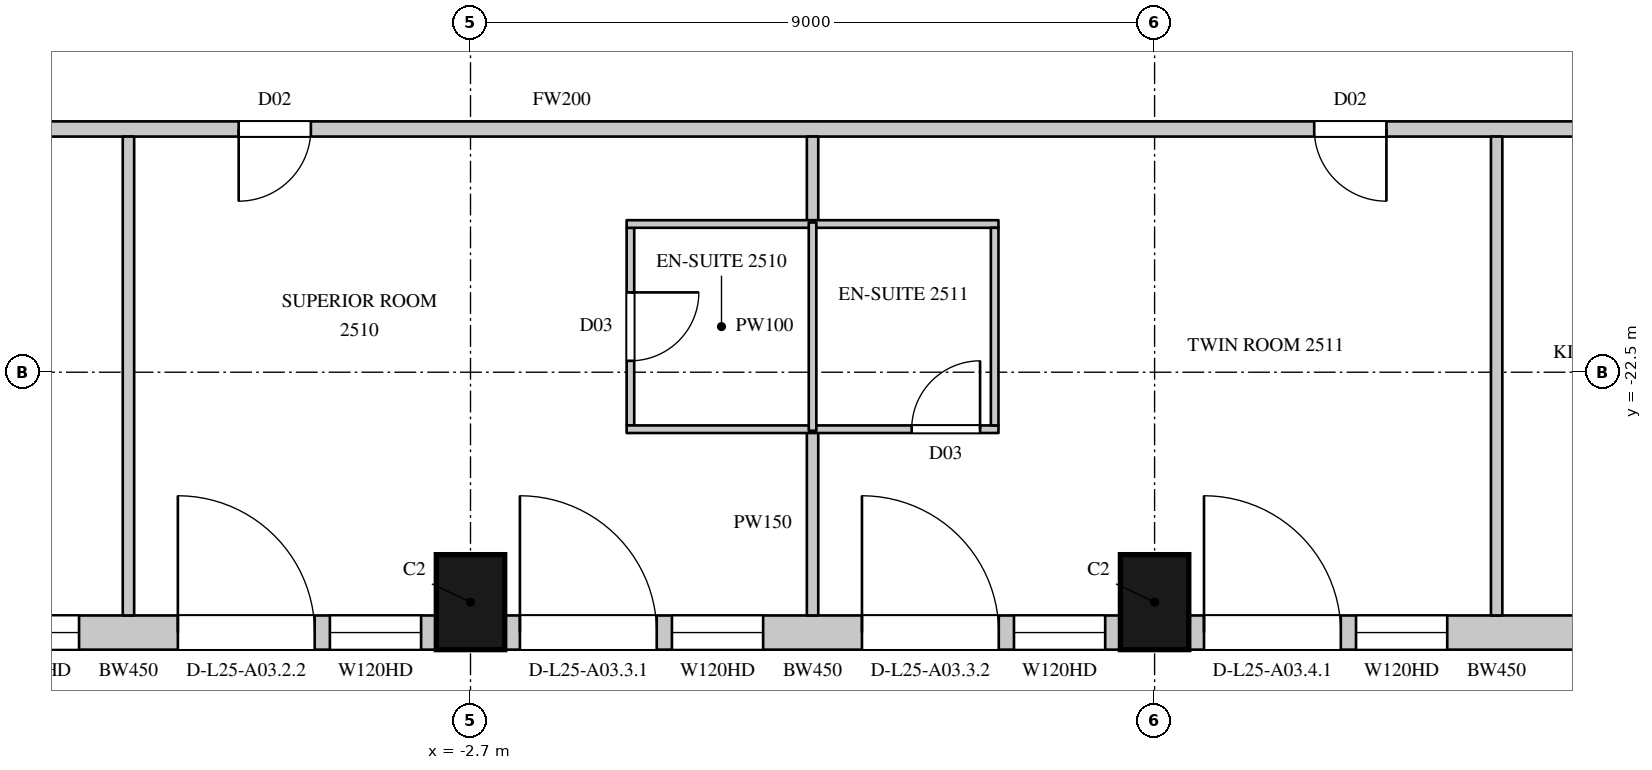
"""IFC4 building model, lengths in metres.
Left out: names, types, materials, properties, quantities, classifications, styles, units other than length and angle.
Written with IfcOpenShell. Run it as: python <this file> out.ifc"""

import sys

from ifc_helpers import new_model, si_unit, direction, frame, frame_2d, origin, origin_2d, place, context, subcontext, project, spatial, rectangle, extrude, element, fill, save


model = new_model("IFC4")
c1 = context("Model", 3, precision=1e-05, world=origin(), true_north=direction((0.0, 1.0)))
c2 = subcontext(c1, "Body", "Model", "MODEL_VIEW")
j1 = project(units=[si_unit("LENGTHUNIT", "METRE"), si_unit("PLANEANGLEUNIT", "RADIAN")], contexts=[c1])
p1 = place(None, origin())
s1 = spatial("IfcSite", under=j1, at=p1, CompositionType="ELEMENT")
p2 = place(p1, origin())
s2 = spatial("IfcBuilding", under=s1, at=p2, CompositionType="ELEMENT")
p3 = place(p2, frame((0.0, 0.0, 120.3)))
s3 = spatial("IfcBuildingStorey", under=s2, at=p3, CompositionType="ELEMENT", Elevation=120.3)
for number, where, z_axis, x_axis in (
    (1, (-2.7, -25.525, 0.0), (0.0, 0.0, 1.0), (1.0, 0.0, 0.0)),
    (2, (6.3, -25.525, 0.0), (0.0, 0.0, 1.0), (1.0, 0.0, 0.0)),
):
    element("IfcColumn", number, at=place(p3, frame(where, z_axis=z_axis, x_axis=x_axis)), inside=s3, PredefinedType="COLUMN", context=c2, shape_type="SweptSolid", body=[
        extrude(rectangle(XDim=0.9, YDim=1.25, at=origin_2d()), origin(), (0.0, 0.0, 1.0), 3.6),
    ])
p4 = place(p3, frame((-11.25, -25.925, 0.0), z_axis=(0.0, 0.0, 1.0), x_axis=(1.0, 0.0, 0.0)))
e3 = element("IfcWall", 3, at=p4, inside=s3, PredefinedType="SOLIDWALL", context=c2, shape_type="SweptSolid", body=[
    extrude(rectangle(XDim=8.1, YDim=0.45, at=frame_2d((4.05, 0.0))), origin(), (0.0, 0.0, 1.0), 3.3),
])
p5 = place(p4, frame((0.2, 0.0, 0.0)))
e4 = element("IfcOpeningElement", 4, at=p5, cuts=e3, PredefinedType="OPENING", context=c2, shape_type="SweptSolid", body=[
    extrude(rectangle(XDim=1.8, YDim=2.4, at=frame_2d((0.9, 1.2))), frame((0.0, 0.235, 0.0), z_axis=(0.0, -1.0, 0.0), x_axis=(1.0, 0.0, 0.0)), (0.0, 0.0, 1.0), 0.47),
])
p6 = place(p4, frame((2.2, 0.0, 1.05)))
e5 = element("IfcOpeningElement", 5, at=p6, cuts=e3, PredefinedType="OPENING", context=c2, shape_type="SweptSolid", body=[
    extrude(rectangle(XDim=1.2, YDim=2.0, at=frame_2d((0.6, 1.0))), frame((0.0, 0.235, 0.0), z_axis=(0.0, -1.0, 0.0), x_axis=(1.0, 0.0, 0.0)), (0.0, 0.0, 1.0), 0.47),
])
p7 = place(p4, frame((4.7, 0.0, 0.0)))
e6 = element("IfcOpeningElement", 6, at=p7, cuts=e3, PredefinedType="OPENING", context=c2, shape_type="SweptSolid", body=[
    extrude(rectangle(XDim=1.8, YDim=2.4, at=frame_2d((0.9, 1.2))), frame((0.0, 0.235, 0.0), z_axis=(0.0, -1.0, 0.0), x_axis=(1.0, 0.0, 0.0)), (0.0, 0.0, 1.0), 0.47),
])
p8 = place(p4, frame((6.7, 0.0, 1.05)))
e7 = element("IfcOpeningElement", 7, at=p8, cuts=e3, PredefinedType="OPENING", context=c2, shape_type="SweptSolid", body=[
    extrude(rectangle(XDim=1.2, YDim=2.0, at=frame_2d((0.6, 1.0))), frame((0.0, 0.235, 0.0), z_axis=(0.0, -1.0, 0.0), x_axis=(1.0, 0.0, 0.0)), (0.0, 0.0, 1.0), 0.47),
])
p9 = place(p3, frame((-2.25, -25.925, 0.0), z_axis=(0.0, 0.0, 1.0), x_axis=(1.0, 0.0, 0.0)))
e8 = element("IfcWall", 8, at=p9, inside=s3, PredefinedType="SOLIDWALL", context=c2, shape_type="SweptSolid", body=[
    extrude(rectangle(XDim=8.1, YDim=0.45, at=frame_2d((4.05, 0.0))), origin(), (0.0, 0.0, 1.0), 3.3),
])
p10 = place(p9, frame((0.2, 0.0, 0.0)))
e9 = element("IfcOpeningElement", 9, at=p10, cuts=e8, PredefinedType="OPENING", context=c2, shape_type="SweptSolid", body=[
    extrude(rectangle(XDim=1.8, YDim=2.4, at=frame_2d((0.9, 1.2))), frame((0.0, 0.235, 0.0), z_axis=(0.0, -1.0, 0.0), x_axis=(1.0, 0.0, 0.0)), (0.0, 0.0, 1.0), 0.47),
])
p11 = place(p9, frame((2.2, 0.0, 1.05)))
e10 = element("IfcOpeningElement", 10, at=p11, cuts=e8, PredefinedType="OPENING", context=c2, shape_type="SweptSolid", body=[
    extrude(rectangle(XDim=1.2, YDim=2.0, at=frame_2d((0.6, 1.0))), frame((0.0, 0.235, 0.0), z_axis=(0.0, -1.0, 0.0), x_axis=(1.0, 0.0, 0.0)), (0.0, 0.0, 1.0), 0.47),
])
p12 = place(p9, frame((4.7, 0.0, 0.0)))
e11 = element("IfcOpeningElement", 11, at=p12, cuts=e8, PredefinedType="OPENING", context=c2, shape_type="SweptSolid", body=[
    extrude(rectangle(XDim=1.8, YDim=2.4, at=frame_2d((0.9, 1.2))), frame((0.0, 0.235, 0.0), z_axis=(0.0, -1.0, 0.0), x_axis=(1.0, 0.0, 0.0)), (0.0, 0.0, 1.0), 0.47),
])
p13 = place(p9, frame((6.7, 0.0, 1.05)))
e12 = element("IfcOpeningElement", 12, at=p13, cuts=e8, PredefinedType="OPENING", context=c2, shape_type="SweptSolid", body=[
    extrude(rectangle(XDim=1.2, YDim=2.0, at=frame_2d((0.6, 1.0))), frame((0.0, 0.235, 0.0), z_axis=(0.0, -1.0, 0.0), x_axis=(1.0, 0.0, 0.0)), (0.0, 0.0, 1.0), 0.47),
])
p14 = place(p3, frame((6.75, -25.925, 0.0), z_axis=(0.0, 0.0, 1.0), x_axis=(1.0, 0.0, 0.0)))
e13 = element("IfcWall", 13, at=p14, inside=s3, PredefinedType="SOLIDWALL", context=c2, shape_type="SweptSolid", body=[
    extrude(rectangle(XDim=8.1, YDim=0.45, at=frame_2d((4.05, 0.0))), origin(), (0.0, 0.0, 1.0), 3.3),
])
p15 = place(p14, frame((0.2, 0.0, 0.0)))
e14 = element("IfcOpeningElement", 14, at=p15, cuts=e13, PredefinedType="OPENING", context=c2, shape_type="SweptSolid", body=[
    extrude(rectangle(XDim=1.8, YDim=2.4, at=frame_2d((0.9, 1.2))), frame((0.0, 0.235, 0.0), z_axis=(0.0, -1.0, 0.0), x_axis=(1.0, 0.0, 0.0)), (0.0, 0.0, 1.0), 0.47),
])
p16 = place(p14, frame((2.2, 0.0, 1.05)))
e15 = element("IfcOpeningElement", 15, at=p16, cuts=e13, PredefinedType="OPENING", context=c2, shape_type="SweptSolid", body=[
    extrude(rectangle(XDim=1.2, YDim=2.0, at=frame_2d((0.6, 1.0))), frame((0.0, 0.235, 0.0), z_axis=(0.0, -1.0, 0.0), x_axis=(1.0, 0.0, 0.0)), (0.0, 0.0, 1.0), 0.47),
])
p17 = place(p14, frame((5.4, 0.0, 0.0)))
e16 = element("IfcOpeningElement", 16, at=p17, cuts=e13, PredefinedType="OPENING", context=c2, shape_type="SweptSolid", body=[
    extrude(rectangle(XDim=1.8, YDim=2.4, at=frame_2d((0.9, 1.2))), frame((0.0, 0.235, 0.0), z_axis=(0.0, -1.0, 0.0), x_axis=(1.0, 0.0, 0.0)), (0.0, 0.0, 1.0), 0.47),
])
p18 = place(p3, frame((-20.8, -19.3, 0.0), z_axis=(0.0, 0.0, 1.0), x_axis=(1.0, 0.0, 0.0)))
e17 = element("IfcWall", 17, at=p18, inside=s3, PredefinedType="PARTITIONING", context=c2, shape_type="SweptSolid", body=[
    extrude(rectangle(XDim=38.6, YDim=0.2, at=frame_2d((19.3, 0.0))), origin(), (0.0, 0.0, 1.0), 3.3),
])
p19 = place(p18, frame((11.2, 0.0, 0.0)))
e18 = element("IfcOpeningElement", 18, at=p19, cuts=e17, PredefinedType="OPENING", context=c2, shape_type="SweptSolid", body=[
    extrude(rectangle(XDim=0.95, YDim=2.2, at=frame_2d((0.475, 1.1))), frame((0.0, 0.11, 0.0), z_axis=(0.0, -1.0, 0.0), x_axis=(1.0, 0.0, 0.0)), (0.0, 0.0, 1.0), 0.22),
])
p20 = place(p18, frame((15.05, 0.0, 0.0)))
e19 = element("IfcOpeningElement", 19, at=p20, cuts=e17, PredefinedType="OPENING", context=c2, shape_type="SweptSolid", body=[
    extrude(rectangle(XDim=0.95, YDim=2.2, at=frame_2d((0.475, 1.1))), frame((0.0, 0.11, 0.0), z_axis=(0.0, -1.0, 0.0), x_axis=(1.0, 0.0, 0.0)), (0.0, 0.0, 1.0), 0.22),
])
p21 = place(p18, frame((29.2, 0.0, 0.0)))
e20 = element("IfcOpeningElement", 20, at=p21, cuts=e17, PredefinedType="OPENING", context=c2, shape_type="SweptSolid", body=[
    extrude(rectangle(XDim=0.95, YDim=2.2, at=frame_2d((0.475, 1.1))), frame((0.0, 0.11, 0.0), z_axis=(0.0, -1.0, 0.0), x_axis=(1.0, 0.0, 0.0)), (0.0, 0.0, 1.0), 0.22),
])
p22 = place(p18, frame((33.05, 0.0, 0.0)))
e21 = element("IfcOpeningElement", 21, at=p22, cuts=e17, PredefinedType="OPENING", context=c2, shape_type="SweptSolid", body=[
    extrude(rectangle(XDim=0.95, YDim=2.2, at=frame_2d((0.475, 1.1))), frame((0.0, 0.11, 0.0), z_axis=(0.0, -1.0, 0.0), x_axis=(1.0, 0.0, 0.0)), (0.0, 0.0, 1.0), 0.22),
])
p23 = place(p3, frame((-7.2, -25.7, 0.0), z_axis=(0.0, 0.0, 1.0), x_axis=(0.0, 1.0, 0.0)))
e22 = element("IfcWall", 22, at=p23, inside=s3, PredefinedType="PARTITIONING", context=c2, shape_type="SweptSolid", body=[
    extrude(rectangle(XDim=6.3, YDim=0.15, at=frame_2d((3.15, 0.0))), origin(), (0.0, 0.0, 1.0), 2.65),
])
p24 = place(p3, frame((1.8, -25.7, 0.0), z_axis=(0.0, 0.0, 1.0), x_axis=(0.0, 1.0, 0.0)))
e23 = element("IfcWall", 23, at=p24, inside=s3, PredefinedType="PARTITIONING", context=c2, shape_type="SweptSolid", body=[
    extrude(rectangle(XDim=2.43, YDim=0.15, at=frame_2d((1.215, 0.0))), origin(), (0.0, 0.0, 1.0), 2.65),
])
p25 = place(p3, frame((1.8, -20.53, 0.0), z_axis=(0.0, 0.0, 1.0), x_axis=(0.0, 1.0, 0.0)))
e24 = element("IfcWall", 24, at=p25, inside=s3, PredefinedType="PARTITIONING", context=c2, shape_type="SweptSolid", body=[
    extrude(rectangle(XDim=1.13, YDim=0.15, at=frame_2d((0.565, 0.0))), origin(), (0.0, 0.0, 1.0), 2.65),
])
p26 = place(p3, frame((10.8, -25.7, 0.0), z_axis=(0.0, 0.0, 1.0), x_axis=(0.0, 1.0, 0.0)))
e25 = element("IfcWall", 25, at=p26, inside=s3, PredefinedType="PARTITIONING", context=c2, shape_type="SweptSolid", body=[
    extrude(rectangle(XDim=6.3, YDim=0.15, at=frame_2d((3.15, 0.0))), origin(), (0.0, 0.0, 1.0), 2.65),
])
p27 = place(p3, frame((-0.596, -23.2, 0.0), z_axis=(0.0, 0.0, 1.0), x_axis=(0.0, 1.0, 0.0)))
e26 = element("IfcWall", 26, at=p27, inside=s3, PredefinedType="PARTITIONING", context=c2, shape_type="SweptSolid", body=[
    extrude(rectangle(XDim=2.6, YDim=0.1, at=frame_2d((1.3, 0.0))), origin(), (0.0, 0.0, 1.0), 3.3),
])
p28 = place(p27, frame((0.85, 0.0, 0.0)))
e27 = element("IfcOpeningElement", 27, at=p28, cuts=e26, PredefinedType="OPENING", context=c2, shape_type="SweptSolid", body=[
    extrude(rectangle(XDim=0.9, YDim=2.2, at=frame_2d((0.45, 1.1))), frame((0.0, 0.06, 0.0), z_axis=(0.0, -1.0, 0.0), x_axis=(1.0, 0.0, 0.0)), (0.0, 0.0, 1.0), 0.12),
])
p29 = place(p3, frame((-0.646, -23.25, 0.0), z_axis=(0.0, 0.0, 1.0), x_axis=(1.0, 0.0, 0.0)))
e28 = element("IfcWall", 28, at=p29, inside=s3, PredefinedType="PARTITIONING", context=c2, shape_type="SweptSolid", body=[
    extrude(rectangle(XDim=4.892, YDim=0.1, at=frame_2d((2.446, 0.0))), origin(), (0.0, 0.0, 1.0), 3.3),
])
p30 = place(p29, frame((3.75, 0.0, 0.0)))
e29 = element("IfcOpeningElement", 29, at=p30, cuts=e28, PredefinedType="OPENING", context=c2, shape_type="SweptSolid", body=[
    extrude(rectangle(XDim=0.9, YDim=2.2, at=frame_2d((0.45, 1.1))), frame((0.0, 0.06, 0.0), z_axis=(0.0, -1.0, 0.0), x_axis=(1.0, 0.0, 0.0)), (0.0, 0.0, 1.0), 0.12),
])
p31 = place(p3, frame((-0.646, -20.55, 0.0), z_axis=(0.0, 0.0, 1.0), x_axis=(1.0, 0.0, 0.0)))
e30 = element("IfcWall", 30, at=p31, inside=s3, PredefinedType="PARTITIONING", context=c2, shape_type="SweptSolid", body=[
    extrude(rectangle(XDim=4.892, YDim=0.1, at=frame_2d((2.446, 0.0))), origin(), (0.0, 0.0, 1.0), 3.3),
])
p32 = place(p3, frame((1.8, -23.27, 0.0), z_axis=(0.0, 0.0, 1.0), x_axis=(0.0, 1.0, 0.0)))
e31 = element("IfcWall", 31, at=p32, inside=s3, PredefinedType="PARTITIONING", context=c2, shape_type="SweptSolid", body=[
    extrude(rectangle(XDim=2.74, YDim=0.1, at=frame_2d((1.37, 0.0))), origin(), (0.0, 0.0, 1.0), 2.65),
])
p33 = place(p3, frame((4.196, -23.2, 0.0), z_axis=(0.0, 0.0, 1.0), x_axis=(0.0, 1.0, 0.0)))
e32 = element("IfcWall", 32, at=p33, inside=s3, PredefinedType="PARTITIONING", context=c2, shape_type="SweptSolid", body=[
    extrude(rectangle(XDim=2.6, YDim=0.1, at=frame_2d((1.3, 0.0))), origin(), (0.0, 0.0, 1.0), 3.3),
])
p34 = place(p6, origin())
e33 = element("IfcWindow", 33, at=p34, inside=s3, PartitioningType="SINGLE_PANEL", PredefinedType="WINDOW", context=c2, shape_type="SweptSolid", body=[
    extrude(rectangle(XDim=1.2, YDim=2.0, at=frame_2d((0.6, 1.0))), frame((0.0, 0.135, 0.0), z_axis=(0.0, -1.0, 0.0), x_axis=(1.0, 0.0, 0.0)), (0.0, 0.0, 1.0), 0.06),
])
fill(e5, e33)
p35 = place(p7, origin())
e34 = element("IfcDoor", 34, at=p35, inside=s3, OperationType="SLIDING_TO_LEFT", PredefinedType="DOOR", context=c2, shape_type="SweptSolid", body=[
    extrude(rectangle(XDim=1.8, YDim=2.4, at=frame_2d((0.9, 1.2))), frame((0.0, 0.13, 0.0), z_axis=(0.0, -1.0, 0.0), x_axis=(1.0, 0.0, 0.0)), (0.0, 0.0, 1.0), 0.05),
])
fill(e6, e34)
p36 = place(p8, origin())
e35 = element("IfcWindow", 35, at=p36, inside=s3, PartitioningType="SINGLE_PANEL", PredefinedType="WINDOW", context=c2, shape_type="SweptSolid", body=[
    extrude(rectangle(XDim=1.2, YDim=2.0, at=frame_2d((0.6, 1.0))), frame((0.0, 0.135, 0.0), z_axis=(0.0, -1.0, 0.0), x_axis=(1.0, 0.0, 0.0)), (0.0, 0.0, 1.0), 0.06),
])
fill(e7, e35)
p37 = place(p10, origin())
e36 = element("IfcDoor", 36, at=p37, inside=s3, OperationType="SLIDING_TO_LEFT", PredefinedType="DOOR", context=c2, shape_type="SweptSolid", body=[
    extrude(rectangle(XDim=1.8, YDim=2.4, at=frame_2d((0.9, 1.2))), frame((0.0, 0.13, 0.0), z_axis=(0.0, -1.0, 0.0), x_axis=(1.0, 0.0, 0.0)), (0.0, 0.0, 1.0), 0.05),
])
fill(e9, e36)
p38 = place(p11, origin())
e37 = element("IfcWindow", 37, at=p38, inside=s3, PartitioningType="SINGLE_PANEL", PredefinedType="WINDOW", context=c2, shape_type="SweptSolid", body=[
    extrude(rectangle(XDim=1.2, YDim=2.0, at=frame_2d((0.6, 1.0))), frame((0.0, 0.135, 0.0), z_axis=(0.0, -1.0, 0.0), x_axis=(1.0, 0.0, 0.0)), (0.0, 0.0, 1.0), 0.06),
])
fill(e10, e37)
p39 = place(p12, origin())
e38 = element("IfcDoor", 38, at=p39, inside=s3, OperationType="SLIDING_TO_LEFT", PredefinedType="DOOR", context=c2, shape_type="SweptSolid", body=[
    extrude(rectangle(XDim=1.8, YDim=2.4, at=frame_2d((0.9, 1.2))), frame((0.0, 0.13, 0.0), z_axis=(0.0, -1.0, 0.0), x_axis=(1.0, 0.0, 0.0)), (0.0, 0.0, 1.0), 0.05),
])
fill(e11, e38)
p40 = place(p13, origin())
e39 = element("IfcWindow", 39, at=p40, inside=s3, PartitioningType="SINGLE_PANEL", PredefinedType="WINDOW", context=c2, shape_type="SweptSolid", body=[
    extrude(rectangle(XDim=1.2, YDim=2.0, at=frame_2d((0.6, 1.0))), frame((0.0, 0.135, 0.0), z_axis=(0.0, -1.0, 0.0), x_axis=(1.0, 0.0, 0.0)), (0.0, 0.0, 1.0), 0.06),
])
fill(e12, e39)
p41 = place(p15, origin())
e40 = element("IfcDoor", 40, at=p41, inside=s3, OperationType="SLIDING_TO_LEFT", PredefinedType="DOOR", context=c2, shape_type="SweptSolid", body=[
    extrude(rectangle(XDim=1.8, YDim=2.4, at=frame_2d((0.9, 1.2))), frame((0.0, 0.13, 0.0), z_axis=(0.0, -1.0, 0.0), x_axis=(1.0, 0.0, 0.0)), (0.0, 0.0, 1.0), 0.05),
])
fill(e14, e40)
p42 = place(p16, origin())
e41 = element("IfcWindow", 41, at=p42, inside=s3, PartitioningType="SINGLE_PANEL", PredefinedType="WINDOW", context=c2, shape_type="SweptSolid", body=[
    extrude(rectangle(XDim=1.2, YDim=2.0, at=frame_2d((0.6, 1.0))), frame((0.0, 0.135, 0.0), z_axis=(0.0, -1.0, 0.0), x_axis=(1.0, 0.0, 0.0)), (0.0, 0.0, 1.0), 0.06),
])
fill(e15, e41)
p43 = place(p20, origin())
e42 = element("IfcDoor", 42, at=p43, inside=s3, OperationType="SINGLE_SWING_RIGHT", PredefinedType="DOOR", context=c2, shape_type="SweptSolid", body=[
    extrude(rectangle(XDim=0.95, YDim=2.2, at=frame_2d((0.475, 1.1))), frame((0.0, 0.025, 0.0), z_axis=(0.0, -1.0, 0.0), x_axis=(1.0, 0.0, 0.0)), (0.0, 0.0, 1.0), 0.05),
])
fill(e19, e42)
p44 = place(p28, origin())
e43 = element("IfcDoor", 43, at=p44, inside=s3, OperationType="SINGLE_SWING_LEFT", PredefinedType="DOOR", context=c2, shape_type="SweptSolid", body=[
    extrude(rectangle(XDim=0.9, YDim=2.2, at=frame_2d((0.45, 1.1))), frame((0.0, 0.025, 0.0), z_axis=(0.0, -1.0, 0.0), x_axis=(1.0, 0.0, 0.0)), (0.0, 0.0, 1.0), 0.05),
])
fill(e27, e43)
p45 = place(p21, origin())
e44 = element("IfcDoor", 44, at=p45, inside=s3, OperationType="SINGLE_SWING_LEFT", PredefinedType="DOOR", context=c2, shape_type="SweptSolid", body=[
    extrude(rectangle(XDim=0.95, YDim=2.2, at=frame_2d((0.475, 1.1))), frame((0.0, 0.025, 0.0), z_axis=(0.0, -1.0, 0.0), x_axis=(1.0, 0.0, 0.0)), (0.0, 0.0, 1.0), 0.05),
])
fill(e20, e44)
p46 = place(p30, origin())
e45 = element("IfcDoor", 45, at=p46, inside=s3, OperationType="SINGLE_SWING_RIGHT", PredefinedType="DOOR", context=c2, shape_type="SweptSolid", body=[
    extrude(rectangle(XDim=0.9, YDim=2.2, at=frame_2d((0.45, 1.1))), frame((0.0, 0.025, 0.0), z_axis=(0.0, -1.0, 0.0), x_axis=(1.0, 0.0, 0.0)), (0.0, 0.0, 1.0), 0.05),
])
fill(e29, e45)
save(model, sys.argv[1])
